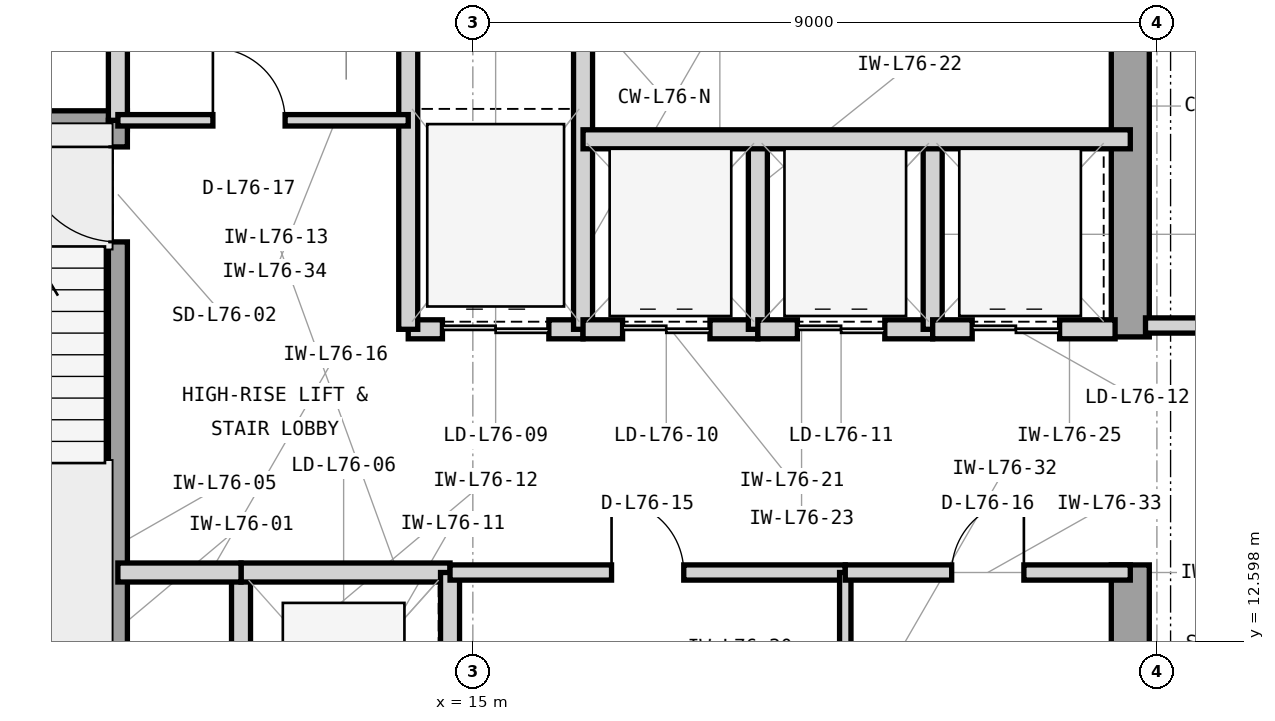
"""IFC4 building model, lengths in metres.
Left out: names, types, materials, properties, quantities, classifications, styles, units other than length and angle.
Written with IfcOpenShell. Run it as: python <this file> out.ifc"""

import sys

from ifc_helpers import new_model, si_unit, direction, frame, frame_2d, origin, place, context, subcontext, project, spatial, rectangle, extrude, element, fill, save


model = new_model("IFC4")
c1 = context("Model", 3, precision=1e-05, world=origin(), true_north=direction((0.0, 1.0)))
c2 = subcontext(c1, "Body", "Model", "MODEL_VIEW")
j1 = project(units=[si_unit("LENGTHUNIT", "METRE"), si_unit("PLANEANGLEUNIT", "RADIAN")], contexts=[c1])
p1 = place(None, origin())
s1 = spatial("IfcSite", under=j1, at=p1, CompositionType="ELEMENT")
p2 = place(p1, origin())
s2 = spatial("IfcBuilding", under=s1, at=p2, CompositionType="ELEMENT")
p3 = place(p2, frame((0.0, 0.0, 309.3)))
s3 = spatial("IfcBuildingStorey", under=s2, at=p3, CompositionType="ELEMENT", Elevation=309.3)
p4 = place(p3, frame((23.65, 10.4, 0.0), z_axis=(0.0, 0.0, 1.0), x_axis=(0.0, 1.0, 0.0)))
e1 = element("IfcWall", 1, at=p4, inside=s3, PredefinedType="SHEAR", context=c2, shape_type="SweptSolid", body=[
    extrude(rectangle(XDim=3.2, YDim=0.5, at=frame_2d((1.6, 0.0))), origin(), (0.0, 0.0, 1.0), 3.9),
])
p5 = place(p3, frame((23.65, 16.6, 0.0), z_axis=(0.0, 0.0, 1.0), x_axis=(0.0, 1.0, 0.0)))
e2 = element("IfcWall", 2, at=p5, inside=s3, PredefinedType="SHEAR", context=c2, shape_type="SweptSolid", body=[
    extrude(rectangle(XDim=4.05, YDim=0.5, at=frame_2d((2.025, 0.0))), origin(), (0.0, 0.0, 1.0), 3.9),
])
p6 = place(p3, frame((7.7, 19.45, 0.0), z_axis=(0.0, 0.0, 1.0), x_axis=(1.0, 0.0, 0.0)))
e3 = element("IfcWall", 3, at=p6, inside=s3, PredefinedType="SHEAR", context=c2, shape_type="SweptSolid", body=[
    extrude(rectangle(XDim=2.755, YDim=0.25, at=frame_2d((1.377, 0.0))), origin(), (0.0, 0.0, 1.0), 3.9),
])
p7 = place(p3, frame((10.33, 12.0, 0.0), z_axis=(0.0, 0.0, 1.0), x_axis=(0.0, 1.0, 0.0)))
e4 = element("IfcWall", 4, at=p7, inside=s3, PredefinedType="SHEAR", context=c2, shape_type="SweptSolid", body=[
    extrude(rectangle(XDim=7.45, YDim=0.25, at=frame_2d((3.725, 0.0))), origin(), (0.0, 0.0, 1.0), 3.9),
])
p8 = place(p7, frame((5.85, 0.0, 0.0)))
e5 = element("IfcOpeningElement", 5, at=p8, cuts=e4, PredefinedType="OPENING", context=c2, shape_type="SweptSolid", body=[
    extrude(rectangle(XDim=1.25, YDim=2.2, at=frame_2d((0.625, 1.1))), frame((0.0, 0.135, 0.0), z_axis=(0.0, -1.0, 0.0), x_axis=(1.0, 0.0, 0.0)), (0.0, 0.0, 1.0), 0.27),
])
p9 = place(p3, frame((10.33, 19.45, 0.0), z_axis=(0.0, 0.0, 1.0), x_axis=(0.0, 1.0, 0.0)))
e6 = element("IfcWall", 6, at=p9, inside=s3, PredefinedType="PARTITIONING", context=c2, shape_type="SweptSolid", body=[
    extrude(rectangle(XDim=1.2, YDim=0.25, at=frame_2d((0.6, 0.0))), origin(), (0.0, 0.0, 1.0), 3.61),
])
p10 = place(p3, frame((11.95, 10.5, 0.0), z_axis=(0.0, 0.0, 1.0), x_axis=(0.0, 1.0, 0.0)))
e7 = element("IfcWall", 7, at=p10, inside=s3, PredefinedType="PARTITIONING", context=c2, shape_type="SweptSolid", body=[
    extrude(rectangle(XDim=3.0, YDim=0.25, at=frame_2d((1.5, 0.0))), origin(), (0.0, 0.0, 1.0), 3.61),
])
p11 = place(p3, frame((11.95, 13.5, 0.0), z_axis=(0.0, 0.0, 1.0), x_axis=(1.0, 0.0, 0.0)))
e8 = element("IfcWall", 8, at=p11, inside=s3, PredefinedType="PARTITIONING", context=c2, shape_type="SweptSolid", body=[
    extrude(rectangle(XDim=2.75, YDim=0.25, at=frame_2d((1.375, 0.0))), origin(), (0.0, 0.0, 1.0), 3.203),
])
p12 = place(p3, frame((14.7, 10.5, 0.0), z_axis=(0.0, 0.0, 1.0), x_axis=(0.0, 1.0, 0.0)))
e9 = element("IfcWall", 9, at=p12, inside=s3, PredefinedType="PARTITIONING", context=c2, shape_type="SweptSolid", body=[
    extrude(rectangle(XDim=3.0, YDim=0.25, at=frame_2d((1.5, 0.0))), origin(), (0.0, 0.0, 1.0), 3.61),
])
p13 = place(p3, frame((10.33, 13.5, 0.0), z_axis=(0.0, 0.0, 1.0), x_axis=(1.0, 0.0, 0.0)))
e10 = element("IfcWall", 10, at=p13, inside=s3, PredefinedType="PARTITIONING", context=c2, shape_type="SweptSolid", body=[
    extrude(rectangle(XDim=1.62, YDim=0.25, at=frame_2d((0.81, 0.0))), origin(), (0.0, 0.0, 1.0), 3.203),
])
p14 = place(p3, frame((14.15, 16.7, 0.0), z_axis=(0.0, 0.0, 1.0), x_axis=(1.0, 0.0, 0.0)))
e11 = element("IfcWall", 11, at=p14, inside=s3, PredefinedType="PARTITIONING", context=c2, shape_type="SweptSolid", body=[
    extrude(rectangle(XDim=2.3, YDim=0.25, at=frame_2d((1.15, 0.0))), origin(), (0.0, 0.0, 1.0), 3.203),
])
p15 = place(p14, frame((0.45, 0.0, 0.0)))
e12 = element("IfcOpeningElement", 12, at=p15, cuts=e11, PredefinedType="OPENING", context=c2, shape_type="SweptSolid", body=[
    extrude(rectangle(XDim=1.4, YDim=2.35, at=frame_2d((0.7, 1.175))), frame((0.0, 0.135, 0.0), z_axis=(0.0, -1.0, 0.0), x_axis=(1.0, 0.0, 0.0)), (0.0, 0.0, 1.0), 0.27),
])
for number, where, z_axis, x_axis in (
    (13, (14.15, 16.7, 0.0), (0.0, 0.0, 1.0), (0.0, 1.0, 0.0)),
    (14, (16.45, 16.7, 0.0), (0.0, 0.0, 1.0), (0.0, 1.0, 0.0)),
):
    element("IfcWall", number, at=place(p3, frame(where, z_axis=z_axis, x_axis=x_axis)), inside=s3, PredefinedType="PARTITIONING", context=c2, shape_type="SweptSolid", body=[
        extrude(rectangle(XDim=3.95, YDim=0.25, at=frame_2d((1.975, 0.0))), origin(), (0.0, 0.0, 1.0), 3.61),
    ])
p16 = place(p3, frame((16.45, 16.7, 0.0), z_axis=(0.0, 0.0, 1.0), x_axis=(1.0, 0.0, 0.0)))
e15 = element("IfcWall", 15, at=p16, inside=s3, PredefinedType="PARTITIONING", context=c2, shape_type="SweptSolid", body=[
    extrude(rectangle(XDim=2.3, YDim=0.25, at=frame_2d((1.15, 0.0))), origin(), (0.0, 0.0, 1.0), 3.203),
])
p17 = place(p16, frame((0.52, 0.0, 0.0)))
e16 = element("IfcOpeningElement", 16, at=p17, cuts=e15, PredefinedType="OPENING", context=c2, shape_type="SweptSolid", body=[
    extrude(rectangle(XDim=1.15, YDim=2.25, at=frame_2d((0.575, 1.125))), frame((0.0, 0.135, 0.0), z_axis=(0.0, -1.0, 0.0), x_axis=(1.0, 0.0, 0.0)), (0.0, 0.0, 1.0), 0.27),
])
p18 = place(p3, frame((18.75, 16.7, 0.0), z_axis=(0.0, 0.0, 1.0), x_axis=(0.0, 1.0, 0.0)))
e17 = element("IfcWall", 17, at=p18, inside=s3, PredefinedType="PARTITIONING", context=c2, shape_type="SweptSolid", body=[
    extrude(rectangle(XDim=2.5, YDim=0.25, at=frame_2d((1.25, 0.0))), origin(), (0.0, 0.0, 1.0), 3.61),
])
p19 = place(p3, frame((18.75, 16.7, 0.0), z_axis=(0.0, 0.0, 1.0), x_axis=(1.0, 0.0, 0.0)))
e18 = element("IfcWall", 18, at=p19, inside=s3, PredefinedType="PARTITIONING", context=c2, shape_type="SweptSolid", body=[
    extrude(rectangle(XDim=2.3, YDim=0.25, at=frame_2d((1.15, 0.0))), origin(), (0.0, 0.0, 1.0), 3.203),
])
p20 = place(p19, frame((0.52, 0.0, 0.0)))
e19 = element("IfcOpeningElement", 19, at=p20, cuts=e18, PredefinedType="OPENING", context=c2, shape_type="SweptSolid", body=[
    extrude(rectangle(XDim=1.15, YDim=2.25, at=frame_2d((0.575, 1.125))), frame((0.0, 0.135, 0.0), z_axis=(0.0, -1.0, 0.0), x_axis=(1.0, 0.0, 0.0)), (0.0, 0.0, 1.0), 0.27),
])
p21 = place(p3, frame((21.05, 16.7, 0.0), z_axis=(0.0, 0.0, 1.0), x_axis=(0.0, 1.0, 0.0)))
e20 = element("IfcWall", 20, at=p21, inside=s3, PredefinedType="PARTITIONING", context=c2, shape_type="SweptSolid", body=[
    extrude(rectangle(XDim=2.5, YDim=0.25, at=frame_2d((1.25, 0.0))), origin(), (0.0, 0.0, 1.0), 3.61),
])
p22 = place(p3, frame((21.05, 16.7, 0.0), z_axis=(0.0, 0.0, 1.0), x_axis=(1.0, 0.0, 0.0)))
e21 = element("IfcWall", 21, at=p22, inside=s3, PredefinedType="PARTITIONING", context=c2, shape_type="SweptSolid", body=[
    extrude(rectangle(XDim=2.4, YDim=0.25, at=frame_2d((1.2, 0.0))), origin(), (0.0, 0.0, 1.0), 3.203),
])
p23 = place(p22, frame((0.52, 0.0, 0.0)))
e22 = element("IfcOpeningElement", 22, at=p23, cuts=e21, PredefinedType="OPENING", context=c2, shape_type="SweptSolid", body=[
    extrude(rectangle(XDim=1.15, YDim=2.25, at=frame_2d((0.575, 1.125))), frame((0.0, 0.135, 0.0), z_axis=(0.0, -1.0, 0.0), x_axis=(1.0, 0.0, 0.0)), (0.0, 0.0, 1.0), 0.27),
])
p24 = place(p3, frame((16.45, 19.2, 0.0), z_axis=(0.0, 0.0, 1.0), x_axis=(1.0, 0.0, 0.0)))
e23 = element("IfcWall", 23, at=p24, inside=s3, PredefinedType="PARTITIONING", context=c2, shape_type="SweptSolid", body=[
    extrude(rectangle(XDim=7.2, YDim=0.25, at=frame_2d((3.6, 0.0))), origin(), (0.0, 0.0, 1.0), 3.61),
])
p25 = place(p3, frame((14.7, 13.5, 0.0), z_axis=(0.0, 0.0, 1.0), x_axis=(1.0, 0.0, 0.0)))
e24 = element("IfcWall", 24, at=p25, inside=s3, PredefinedType="PARTITIONING", context=c2, shape_type="SweptSolid", body=[
    extrude(rectangle(XDim=5.2, YDim=0.2, at=frame_2d((2.6, 0.0))), origin(), (0.0, 0.0, 1.0), 3.203),
])
p26 = place(p25, frame((2.125, 0.0, 0.0)))
e25 = element("IfcOpeningElement", 25, at=p26, cuts=e24, PredefinedType="OPENING", context=c2, shape_type="SweptSolid", body=[
    extrude(rectangle(XDim=0.95, YDim=2.1, at=frame_2d((0.475, 1.05))), frame((0.0, 0.11, 0.0), z_axis=(0.0, -1.0, 0.0), x_axis=(1.0, 0.0, 0.0)), (0.0, 0.0, 1.0), 0.22),
])
p27 = place(p3, frame((19.9, 10.465, 0.0), z_axis=(0.0, 0.0, 1.0), x_axis=(0.0, 1.0, 0.0)))
e26 = element("IfcWall", 26, at=p27, inside=s3, PredefinedType="PARTITIONING", context=c2, shape_type="SweptSolid", body=[
    extrude(rectangle(XDim=3.035, YDim=0.15, at=frame_2d((1.518, 0.0))), origin(), (0.0, 0.0, 1.0), 3.61),
])
p28 = place(p3, frame((19.9, 13.5, 0.0), z_axis=(0.0, 0.0, 1.0), x_axis=(1.0, 0.0, 0.0)))
e27 = element("IfcWall", 27, at=p28, inside=s3, PredefinedType="PARTITIONING", context=c2, shape_type="SweptSolid", body=[
    extrude(rectangle(XDim=3.75, YDim=0.2, at=frame_2d((1.875, 0.0))), origin(), (0.0, 0.0, 1.0), 3.203),
])
p29 = place(p28, frame((1.4, 0.0, 0.0)))
e28 = element("IfcOpeningElement", 28, at=p29, cuts=e27, PredefinedType="OPENING", context=c2, shape_type="SweptSolid", body=[
    extrude(rectangle(XDim=0.95, YDim=2.1, at=frame_2d((0.475, 1.05))), frame((0.0, 0.11, 0.0), z_axis=(0.0, -1.0, 0.0), x_axis=(1.0, 0.0, 0.0)), (0.0, 0.0, 1.0), 0.22),
])
p30 = place(p3, frame((10.33, 19.45, 0.0), z_axis=(0.0, 0.0, 1.0), x_axis=(1.0, 0.0, 0.0)))
e29 = element("IfcWall", 29, at=p30, inside=s3, PredefinedType="PARTITIONING", context=c2, shape_type="SweptSolid", body=[
    extrude(rectangle(XDim=3.82, YDim=0.15, at=frame_2d((1.91, 0.0))), origin(), (0.0, 0.0, 1.0), 3.61),
])
p31 = place(p30, frame((1.25, 0.0, 0.0)))
e30 = element("IfcOpeningElement", 30, at=p31, cuts=e29, PredefinedType="OPENING", context=c2, shape_type="SweptSolid", body=[
    extrude(rectangle(XDim=0.95, YDim=2.1, at=frame_2d((0.475, 1.05))), frame((0.0, 0.085, 0.0), z_axis=(0.0, -1.0, 0.0), x_axis=(1.0, 0.0, 0.0)), (0.0, 0.0, 1.0), 0.17),
])
p32 = place(p3, frame((23.85, 16.75, 0.0), z_axis=(0.0, 0.0, 1.0), x_axis=(1.0, 0.0, 0.0)))
e31 = element("IfcWall", 31, at=p32, inside=s3, PredefinedType="PARTITIONING", context=c2, shape_type="SweptSolid", body=[
    extrude(rectangle(XDim=7.35, YDim=0.2, at=frame_2d((3.675, 0.0))), origin(), (0.0, 0.0, 1.0), 3.61),
])
p33 = place(p32, frame((2.8, 0.0, 0.0)))
e32 = element("IfcOpeningElement", 32, at=p33, cuts=e31, PredefinedType="OPENING", context=c2, shape_type="SweptSolid", body=[
    extrude(rectangle(XDim=1.0, YDim=2.15, at=frame_2d((0.5, 1.075))), frame((0.0, 0.11, 0.0), z_axis=(0.0, -1.0, 0.0), x_axis=(1.0, 0.0, 0.0)), (0.0, 0.0, 1.0), 0.22),
])
p34 = place(p8, origin())
e33 = element("IfcDoor", 33, at=p34, inside=s3, OperationType="SINGLE_SWING_RIGHT", PredefinedType="DOOR", context=c2, shape_type="SweptSolid", body=[
    extrude(rectangle(XDim=1.25, YDim=2.2, at=frame_2d((0.625, 1.1))), frame((0.0, 0.025, 0.0), z_axis=(0.0, -1.0, 0.0), x_axis=(1.0, 0.0, 0.0)), (0.0, 0.0, 1.0), 0.05),
])
fill(e5, e33)
p35 = place(p15, origin())
e34 = element("IfcDoor", 34, at=p35, inside=s3, OperationType="DOUBLE_DOOR_SLIDING", PredefinedType="DOOR", context=c2, shape_type="SweptSolid", body=[
    extrude(rectangle(XDim=1.4, YDim=2.35, at=frame_2d((0.7, 1.175))), frame((0.0, 0.025, 0.0), z_axis=(0.0, -1.0, 0.0), x_axis=(1.0, 0.0, 0.0)), (0.0, 0.0, 1.0), 0.05),
])
fill(e12, e34)
p36 = place(p17, origin())
e35 = element("IfcDoor", 35, at=p36, inside=s3, OperationType="DOUBLE_DOOR_SLIDING", PredefinedType="DOOR", context=c2, shape_type="SweptSolid", body=[
    extrude(rectangle(XDim=1.15, YDim=2.25, at=frame_2d((0.575, 1.125))), frame((0.0, 0.025, 0.0), z_axis=(0.0, -1.0, 0.0), x_axis=(1.0, 0.0, 0.0)), (0.0, 0.0, 1.0), 0.05),
])
fill(e16, e35)
p37 = place(p20, origin())
e36 = element("IfcDoor", 36, at=p37, inside=s3, OperationType="DOUBLE_DOOR_SLIDING", PredefinedType="DOOR", context=c2, shape_type="SweptSolid", body=[
    extrude(rectangle(XDim=1.15, YDim=2.25, at=frame_2d((0.575, 1.125))), frame((0.0, 0.025, 0.0), z_axis=(0.0, -1.0, 0.0), x_axis=(1.0, 0.0, 0.0)), (0.0, 0.0, 1.0), 0.05),
])
fill(e19, e36)
p38 = place(p23, origin())
e37 = element("IfcDoor", 37, at=p38, inside=s3, OperationType="DOUBLE_DOOR_SLIDING", PredefinedType="DOOR", context=c2, shape_type="SweptSolid", body=[
    extrude(rectangle(XDim=1.15, YDim=2.25, at=frame_2d((0.575, 1.125))), frame((0.0, 0.025, 0.0), z_axis=(0.0, -1.0, 0.0), x_axis=(1.0, 0.0, 0.0)), (0.0, 0.0, 1.0), 0.05),
])
fill(e22, e37)
p39 = place(p26, origin())
e38 = element("IfcDoor", 38, at=p39, inside=s3, OperationType="SINGLE_SWING_LEFT", PredefinedType="DOOR", context=c2, shape_type="SweptSolid", body=[
    extrude(rectangle(XDim=0.95, YDim=2.1, at=frame_2d((0.475, 1.05))), frame((0.0, 0.025, 0.0), z_axis=(0.0, -1.0, 0.0), x_axis=(1.0, 0.0, 0.0)), (0.0, 0.0, 1.0), 0.05),
])
fill(e25, e38)
p40 = place(p29, origin())
e39 = element("IfcDoor", 39, at=p40, inside=s3, OperationType="SINGLE_SWING_RIGHT", PredefinedType="DOOR", context=c2, shape_type="SweptSolid", body=[
    extrude(rectangle(XDim=0.95, YDim=2.1, at=frame_2d((0.475, 1.05))), frame((0.0, 0.025, 0.0), z_axis=(0.0, -1.0, 0.0), x_axis=(1.0, 0.0, 0.0)), (0.0, 0.0, 1.0), 0.05),
])
fill(e28, e39)
p41 = place(p31, origin())
e40 = element("IfcDoor", 40, at=p41, inside=s3, OperationType="SINGLE_SWING_LEFT", PredefinedType="DOOR", context=c2, shape_type="SweptSolid", body=[
    extrude(rectangle(XDim=0.95, YDim=2.1, at=frame_2d((0.475, 1.05))), frame((0.0, 0.025, 0.0), z_axis=(0.0, -1.0, 0.0), x_axis=(1.0, 0.0, 0.0)), (0.0, 0.0, 1.0), 0.05),
])
fill(e30, e40)
save(model, sys.argv[1])
